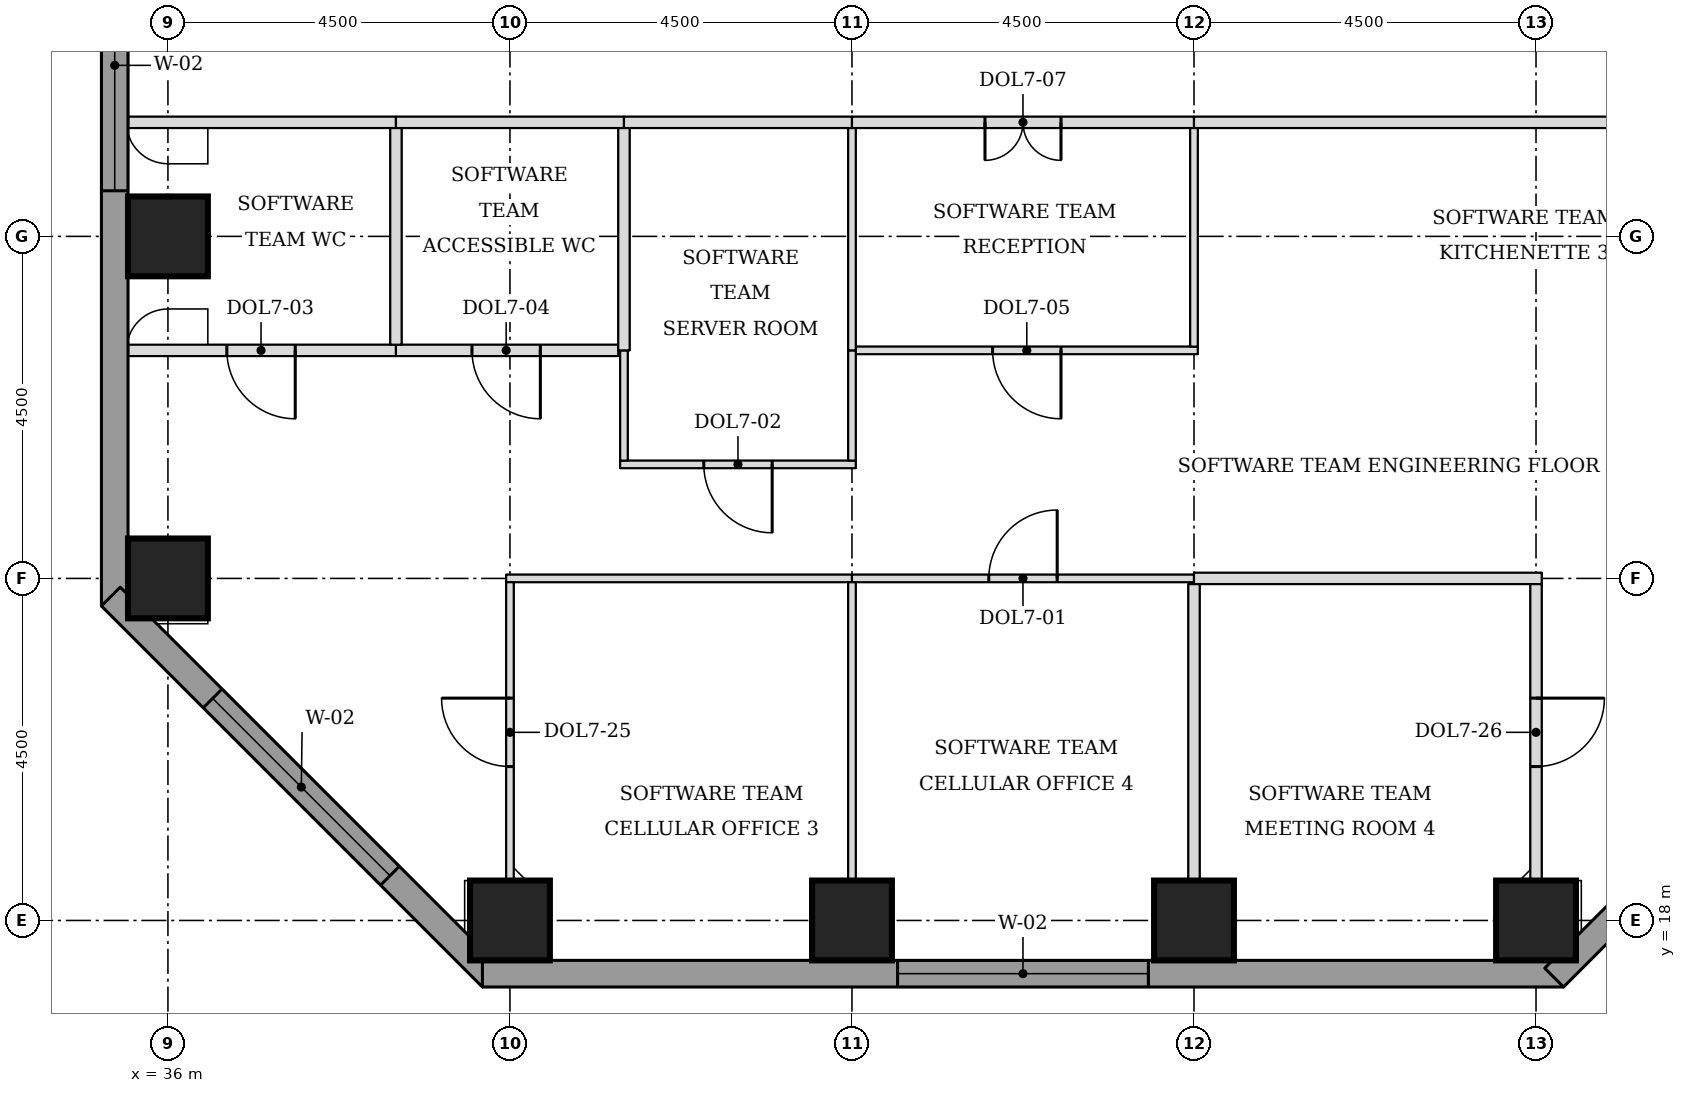
"""IFC4 building model, lengths in metres.
Left out: names, types, materials, properties, quantities, classifications, styles, units other than length and angle.
Written with IfcOpenShell. Run it as: python <this file> out.ifc"""

import sys

from ifc_helpers import new_model, si_unit, direction, frame, frame_2d, origin, origin_2d, place, context, subcontext, project, spatial, rectangle, extrude, element, fill, save


model = new_model("IFC4")
c1 = context("Model", 3, precision=1e-05, world=origin(), true_north=direction((0.0, 1.0)))
c2 = subcontext(c1, "Body", "Model", "MODEL_VIEW")
j1 = project(units=[si_unit("LENGTHUNIT", "METRE"), si_unit("PLANEANGLEUNIT", "RADIAN")], contexts=[c1])
p1 = place(None, origin())
s1 = spatial("IfcSite", under=j1, at=p1, CompositionType="ELEMENT")
p2 = place(p1, origin())
s2 = spatial("IfcBuilding", under=s1, at=p2, CompositionType="ELEMENT")
p3 = place(p2, frame((0.0, 0.0, 134.4)))
s3 = spatial("IfcBuildingStorey", under=s2, at=p3, CompositionType="ELEMENT", Elevation=134.4)
for number, where, z_axis, x_axis in (
    (1, (40.5, 18.0, 0.0), (0.0, 0.0, 1.0), (1.0, 0.0, 0.0)),
    (2, (45.0, 18.0, 0.0), (0.0, 0.0, 1.0), (1.0, 0.0, 0.0)),
    (3, (49.5, 18.0, 0.0), (0.0, 0.0, 1.0), (1.0, 0.0, 0.0)),
    (4, (54.0, 18.0, 0.0), (0.0, 0.0, 1.0), (1.0, 0.0, 0.0)),
    (5, (36.0, 22.5, 0.0), (0.0, 0.0, 1.0), (1.0, 0.0, 0.0)),
    (6, (36.0, 27.0, 0.0), (0.0, 0.0, 1.0), (1.0, 0.0, 0.0)),
):
    element("IfcColumn", number, at=place(p3, frame(where, z_axis=z_axis, x_axis=x_axis)), inside=s3, PredefinedType="COLUMN", context=c2, shape_type="SweptSolid", body=[
        extrude(rectangle(XDim=1.05, YDim=1.05, at=origin_2d()), origin(), (0.0, 0.0, 1.0), 3.7),
    ])
p4 = place(p3, frame((35.3, 39.975, 0.0), z_axis=(0.0, 0.0, 1.0), x_axis=(0.0, -1.0, 0.0)))
e7 = element("IfcWall", 7, at=p4, inside=s3, PredefinedType="STANDARD", context=c2, shape_type="SweptSolid", body=[
    extrude(rectangle(XDim=17.837, YDim=0.35, at=frame_2d((8.919, 0.0))), origin(), (0.0, 0.0, 1.0), 3.525),
])
p5 = place(p4, frame((0.5, 0.0, 0.9)))
e8 = element("IfcOpeningElement", 8, at=p5, cuts=e7, PredefinedType="OPENING", context=c2, shape_type="SweptSolid", body=[
    extrude(rectangle(XDim=3.3, YDim=1.9, at=frame_2d((1.65, 0.95))), frame((0.0, 0.185, 0.0), z_axis=(0.0, -1.0, 0.0), x_axis=(1.0, 0.0, 0.0)), (0.0, 0.0, 1.0), 0.37),
])
p6 = place(p4, frame((9.075, 0.0, 0.9)))
e9 = element("IfcOpeningElement", 9, at=p6, cuts=e7, PredefinedType="OPENING", context=c2, shape_type="SweptSolid", body=[
    extrude(rectangle(XDim=3.3, YDim=1.9, at=frame_2d((1.65, 0.95))), frame((0.0, 0.185, 0.0), z_axis=(0.0, -1.0, 0.0), x_axis=(1.0, 0.0, 0.0)), (0.0, 0.0, 1.0), 0.37),
])
p7 = place(p3, frame((35.249, 22.261, 0.0), z_axis=(0.0, 0.0, 1.0), x_axis=(0.707106781187, -0.707106781187, 0.0)))
e10 = element("IfcWall", 10, at=p7, inside=s3, PredefinedType="STANDARD", context=c2, shape_type="SweptSolid", body=[
    extrude(rectangle(XDim=7.089, YDim=0.35, at=frame_2d((3.544, 0.0))), origin(), (0.0, 0.0, 1.0), 3.525),
])
p8 = place(p7, frame((1.894, 0.0, 0.9)))
e11 = element("IfcOpeningElement", 11, at=p8, cuts=e10, PredefinedType="OPENING", context=c2, shape_type="SweptSolid", body=[
    extrude(rectangle(XDim=3.3, YDim=1.9, at=frame_2d((1.65, 0.95))), frame((0.0, 0.185, 0.0), z_axis=(0.0, -1.0, 0.0), x_axis=(1.0, 0.0, 0.0)), (0.0, 0.0, 1.0), 0.37),
])
p9 = place(p3, frame((40.138, 17.3, 0.0), z_axis=(0.0, 0.0, 1.0), x_axis=(1.0, 0.0, 0.0)))
e12 = element("IfcWall", 12, at=p9, inside=s3, PredefinedType="STANDARD", context=c2, shape_type="SweptSolid", body=[
    extrude(rectangle(XDim=14.225, YDim=0.35, at=frame_2d((7.112, 0.0))), origin(), (0.0, 0.0, 1.0), 3.525),
])
p10 = place(p9, frame((5.462, 0.0, 0.9)))
e13 = element("IfcOpeningElement", 13, at=p10, cuts=e12, PredefinedType="OPENING", context=c2, shape_type="SweptSolid", body=[
    extrude(rectangle(XDim=3.3, YDim=1.9, at=frame_2d((1.65, 0.95))), frame((0.0, 0.185, 0.0), z_axis=(0.0, -1.0, 0.0), x_axis=(1.0, 0.0, 0.0)), (0.0, 0.0, 1.0), 0.37),
])
p11 = place(p3, frame((54.239, 17.249, 0.0), z_axis=(0.0, 0.0, 1.0), x_axis=(0.707106781187, 0.707106781187, 0.0)))
e14 = element("IfcWall", 14, at=p11, inside=s3, PredefinedType="STANDARD", context=c2, shape_type="SweptSolid", body=[
    extrude(rectangle(XDim=7.089, YDim=0.35, at=frame_2d((3.544, 0.0))), origin(), (0.0, 0.0, 1.0), 3.525),
])
p12 = place(p11, frame((1.894, 0.0, 0.9)))
e15 = element("IfcOpeningElement", 15, at=p12, cuts=e14, PredefinedType="OPENING", context=c2, shape_type="SweptSolid", body=[
    extrude(rectangle(XDim=3.3, YDim=1.9, at=frame_2d((1.65, 0.95))), frame((0.0, 0.185, 0.0), z_axis=(0.0, -1.0, 0.0), x_axis=(1.0, 0.0, 0.0)), (0.0, 0.0, 1.0), 0.37),
])
p13 = place(p3, frame((40.45, 22.5, 0.0), z_axis=(0.0, 0.0, 1.0), x_axis=(1.0, 0.0, 0.0)))
e16 = element("IfcWall", 16, at=p13, inside=s3, PredefinedType="PARTITIONING", context=c2, shape_type="SweptSolid", body=[
    extrude(rectangle(XDim=4.55, YDim=0.1, at=frame_2d((2.275, 0.0))), origin(), (0.0, 0.0, 1.0), 2.55),
])
p14 = place(p3, frame((45.0, 22.5, 0.0), z_axis=(0.0, 0.0, 1.0), x_axis=(1.0, 0.0, 0.0)))
e17 = element("IfcWall", 17, at=p14, inside=s3, PredefinedType="PARTITIONING", context=c2, shape_type="SweptSolid", body=[
    extrude(rectangle(XDim=4.5, YDim=0.1, at=frame_2d((2.25, 0.0))), origin(), (0.0, 0.0, 1.0), 2.55),
])
p15 = place(p14, frame((1.8, 0.0, 0.0)))
e18 = element("IfcOpeningElement", 18, at=p15, cuts=e17, PredefinedType="OPENING", context=c2, shape_type="SweptSolid", body=[
    extrude(rectangle(XDim=0.9, YDim=2.1, at=frame_2d((0.45, 1.05))), frame((0.0, 0.06, 0.0), z_axis=(0.0, -1.0, 0.0), x_axis=(1.0, 0.0, 0.0)), (0.0, 0.0, 1.0), 0.12),
])
p16 = place(p3, frame((49.5, 22.5, 0.0), z_axis=(0.0, 0.0, 1.0), x_axis=(1.0, 0.0, 0.0)))
e19 = element("IfcWall", 19, at=p16, inside=s3, PredefinedType="PARTITIONING", context=c2, shape_type="SweptSolid", body=[
    extrude(rectangle(XDim=4.575, YDim=0.15, at=frame_2d((2.288, 0.0))), origin(), (0.0, 0.0, 1.0), 2.55),
])
p17 = place(p3, frame((41.95, 24.0, 0.0), z_axis=(0.0, 0.0, 1.0), x_axis=(1.0, 0.0, 0.0)))
e20 = element("IfcWall", 20, at=p17, inside=s3, PredefinedType="PARTITIONING", context=c2, shape_type="SweptSolid", body=[
    extrude(rectangle(XDim=3.1, YDim=0.1, at=frame_2d((1.55, 0.0))), origin(), (0.0, 0.0, 1.0), 3.55),
])
p18 = place(p17, frame((1.1, 0.0, 0.0)))
e21 = element("IfcOpeningElement", 21, at=p18, cuts=e20, PredefinedType="OPENING", context=c2, shape_type="SweptSolid", body=[
    extrude(rectangle(XDim=0.9, YDim=2.1, at=frame_2d((0.45, 1.05))), frame((0.0, 0.06, 0.0), z_axis=(0.0, -1.0, 0.0), x_axis=(1.0, 0.0, 0.0)), (0.0, 0.0, 1.0), 0.12),
])
p19 = place(p3, frame((35.475, 25.5, 0.0), z_axis=(0.0, 0.0, 1.0), x_axis=(1.0, 0.0, 0.0)))
e22 = element("IfcWall", 22, at=p19, inside=s3, PredefinedType="PARTITIONING", context=c2, shape_type="SweptSolid", body=[
    extrude(rectangle(XDim=3.525, YDim=0.15, at=frame_2d((1.762, 0.0))), origin(), (0.0, 0.0, 1.0), 3.55),
])
p20 = place(p19, frame((1.3, 0.0, 0.0)))
e23 = element("IfcOpeningElement", 23, at=p20, cuts=e22, PredefinedType="OPENING", context=c2, shape_type="SweptSolid", body=[
    extrude(rectangle(XDim=0.9, YDim=2.1, at=frame_2d((0.45, 1.05))), frame((0.0, 0.085, 0.0), z_axis=(0.0, -1.0, 0.0), x_axis=(1.0, 0.0, 0.0)), (0.0, 0.0, 1.0), 0.17),
])
p21 = place(p3, frame((39.0, 25.5, 0.0), z_axis=(0.0, 0.0, 1.0), x_axis=(1.0, 0.0, 0.0)))
e24 = element("IfcWall", 24, at=p21, inside=s3, PredefinedType="PARTITIONING", context=c2, shape_type="SweptSolid", body=[
    extrude(rectangle(XDim=2.925, YDim=0.15, at=frame_2d((1.462, 0.0))), origin(), (0.0, 0.0, 1.0), 3.55),
])
p22 = place(p21, frame((1.0, 0.0, 0.0)))
e25 = element("IfcOpeningElement", 25, at=p22, cuts=e24, PredefinedType="OPENING", context=c2, shape_type="SweptSolid", body=[
    extrude(rectangle(XDim=0.9, YDim=2.1, at=frame_2d((0.45, 1.05))), frame((0.0, 0.085, 0.0), z_axis=(0.0, -1.0, 0.0), x_axis=(1.0, 0.0, 0.0)), (0.0, 0.0, 1.0), 0.17),
])
p23 = place(p3, frame((45.05, 25.5, 0.0), z_axis=(0.0, 0.0, 1.0), x_axis=(1.0, 0.0, 0.0)))
e26 = element("IfcWall", 26, at=p23, inside=s3, PredefinedType="PARTITIONING", context=c2, shape_type="SweptSolid", body=[
    extrude(rectangle(XDim=4.5, YDim=0.1, at=frame_2d((2.25, 0.0))), origin(), (0.0, 0.0, 1.0), 3.55),
])
p24 = place(p23, frame((1.8, 0.0, 0.0)))
e27 = element("IfcOpeningElement", 27, at=p24, cuts=e26, PredefinedType="OPENING", context=c2, shape_type="SweptSolid", body=[
    extrude(rectangle(XDim=0.9, YDim=2.1, at=frame_2d((0.45, 1.05))), frame((0.0, 0.06, 0.0), z_axis=(0.0, -1.0, 0.0), x_axis=(1.0, 0.0, 0.0)), (0.0, 0.0, 1.0), 0.12),
])
p25 = place(p3, frame((35.475, 28.5, 0.0), z_axis=(0.0, 0.0, 1.0), x_axis=(1.0, 0.0, 0.0)))
e28 = element("IfcWall", 28, at=p25, inside=s3, PredefinedType="PARTITIONING", context=c2, shape_type="SweptSolid", body=[
    extrude(rectangle(XDim=3.525, YDim=0.15, at=frame_2d((1.762, 0.0))), origin(), (0.0, 0.0, 1.0), 3.55),
])
for number, where, z_axis, x_axis in (
    (29, (39.0, 28.5, 0.0), (0.0, 0.0, 1.0), (1.0, 0.0, 0.0)),
    (30, (42.0, 28.5, 0.0), (0.0, 0.0, 1.0), (1.0, 0.0, 0.0)),
):
    element("IfcWall", number, at=place(p3, frame(where, z_axis=z_axis, x_axis=x_axis)), inside=s3, PredefinedType="PARTITIONING", context=c2, shape_type="SweptSolid", body=[
        extrude(rectangle(XDim=3.0, YDim=0.15, at=frame_2d((1.5, 0.0))), origin(), (0.0, 0.0, 1.0), 3.55),
    ])
p26 = place(p3, frame((45.0, 28.5, 0.0), z_axis=(0.0, 0.0, 1.0), x_axis=(1.0, 0.0, 0.0)))
e31 = element("IfcWall", 31, at=p26, inside=s3, PredefinedType="PARTITIONING", context=c2, shape_type="SweptSolid", body=[
    extrude(rectangle(XDim=4.5, YDim=0.15, at=frame_2d((2.25, 0.0))), origin(), (0.0, 0.0, 1.0), 3.55),
])
p27 = place(p26, frame((1.75, 0.0, 0.0)))
e32 = element("IfcOpeningElement", 32, at=p27, cuts=e31, PredefinedType="OPENING", context=c2, shape_type="SweptSolid", body=[
    extrude(rectangle(XDim=1.0, YDim=2.1, at=frame_2d((0.5, 1.05))), frame((0.0, 0.085, 0.0), z_axis=(0.0, -1.0, 0.0), x_axis=(1.0, 0.0, 0.0)), (0.0, 0.0, 1.0), 0.17),
])
p28 = place(p3, frame((49.5, 28.5, 0.0), z_axis=(0.0, 0.0, 1.0), x_axis=(1.0, 0.0, 0.0)))
e33 = element("IfcWall", 33, at=p28, inside=s3, PredefinedType="PARTITIONING", context=c2, shape_type="SweptSolid", body=[
    extrude(rectangle(XDim=6.0, YDim=0.15, at=frame_2d((3.0, 0.0))), origin(), (0.0, 0.0, 1.0), 3.55),
])
p29 = place(p3, frame((45.0, 17.475, 0.0), z_axis=(0.0, 0.0, 1.0), x_axis=(0.0, 1.0, 0.0)))
e34 = element("IfcWall", 34, at=p29, inside=s3, PredefinedType="PARTITIONING", context=c2, shape_type="SweptSolid", body=[
    extrude(rectangle(XDim=4.975, YDim=0.1, at=frame_2d((2.487, 0.0))), origin(), (0.0, 0.0, 1.0), 3.55),
])
p30 = place(p3, frame((49.5, 17.475, 0.0), z_axis=(0.0, 0.0, 1.0), x_axis=(0.0, 1.0, 0.0)))
e35 = element("IfcWall", 35, at=p30, inside=s3, PredefinedType="PARTITIONING", context=c2, shape_type="SweptSolid", body=[
    extrude(rectangle(XDim=4.95, YDim=0.15, at=frame_2d((2.475, 0.0))), origin(), (0.0, 0.0, 1.0), 3.55),
])
p31 = place(p3, frame((40.5, 18.525, 0.0), z_axis=(0.0, 0.0, 1.0), x_axis=(0.0, 1.0, 0.0)))
e36 = element("IfcWall", 36, at=p31, inside=s3, PredefinedType="PARTITIONING", context=c2, shape_type="SweptSolid", body=[
    extrude(rectangle(XDim=3.925, YDim=0.1, at=frame_2d((1.962, 0.0))), origin(), (0.0, 0.0, 1.0), 3.55),
])
p32 = place(p31, frame((1.5, 0.0, 0.0)))
e37 = element("IfcOpeningElement", 37, at=p32, cuts=e36, PredefinedType="OPENING", context=c2, shape_type="SweptSolid", body=[
    extrude(rectangle(XDim=0.9, YDim=2.1, at=frame_2d((0.45, 1.05))), frame((0.0, 0.06, 0.0), z_axis=(0.0, -1.0, 0.0), x_axis=(1.0, 0.0, 0.0)), (0.0, 0.0, 1.0), 0.12),
])
p33 = place(p3, frame((54.0, 18.525, 0.0), z_axis=(0.0, 0.0, 1.0), x_axis=(0.0, 1.0, 0.0)))
e38 = element("IfcWall", 38, at=p33, inside=s3, PredefinedType="PARTITIONING", context=c2, shape_type="SweptSolid", body=[
    extrude(rectangle(XDim=3.9, YDim=0.15, at=frame_2d((1.95, 0.0))), origin(), (0.0, 0.0, 1.0), 3.55),
])
p34 = place(p33, frame((1.5, 0.0, 0.0)))
e39 = element("IfcOpeningElement", 39, at=p34, cuts=e38, PredefinedType="OPENING", context=c2, shape_type="SweptSolid", body=[
    extrude(rectangle(XDim=0.9, YDim=2.1, at=frame_2d((0.45, 1.05))), frame((0.0, 0.085, 0.0), z_axis=(0.0, -1.0, 0.0), x_axis=(1.0, 0.0, 0.0)), (0.0, 0.0, 1.0), 0.17),
])
for number, where, z_axis, x_axis in (
    (40, (42.0, 24.05, 0.0), (0.0, 0.0, 1.0), (0.0, 1.0, 0.0)),
    (41, (45.0, 24.05, 0.0), (0.0, 0.0, 1.0), (0.0, 1.0, 0.0)),
):
    element("IfcWall", number, at=place(p3, frame(where, z_axis=z_axis, x_axis=x_axis)), inside=s3, PredefinedType="PARTITIONING", context=c2, shape_type="SweptSolid", body=[
        extrude(rectangle(XDim=1.45, YDim=0.1, at=frame_2d((0.725, 0.0))), origin(), (0.0, 0.0, 1.0), 3.55),
    ])
p35 = place(p3, frame((42.0, 25.5, 0.0), z_axis=(0.0, 0.0, 1.0), x_axis=(0.0, 1.0, 0.0)))
e42 = element("IfcWall", 42, at=p35, inside=s3, PredefinedType="PARTITIONING", context=c2, shape_type="SweptSolid", body=[
    extrude(rectangle(XDim=2.925, YDim=0.15, at=frame_2d((1.462, 0.0))), origin(), (0.0, 0.0, 1.0), 3.55),
])
p36 = place(p3, frame((45.0, 25.5, 0.0), z_axis=(0.0, 0.0, 1.0), x_axis=(0.0, 1.0, 0.0)))
e43 = element("IfcWall", 43, at=p36, inside=s3, PredefinedType="PARTITIONING", context=c2, shape_type="SweptSolid", body=[
    extrude(rectangle(XDim=2.925, YDim=0.1, at=frame_2d((1.462, 0.0))), origin(), (0.0, 0.0, 1.0), 3.55),
])
p37 = place(p3, frame((49.5, 25.55, 0.0), z_axis=(0.0, 0.0, 1.0), x_axis=(0.0, 1.0, 0.0)))
e44 = element("IfcWall", 44, at=p37, inside=s3, PredefinedType="PARTITIONING", context=c2, shape_type="SweptSolid", body=[
    extrude(rectangle(XDim=2.875, YDim=0.1, at=frame_2d((1.438, 0.0))), origin(), (0.0, 0.0, 1.0), 3.55),
])
p38 = place(p3, frame((39.0, 25.575, 0.0), z_axis=(0.0, 0.0, 1.0), x_axis=(0.0, 1.0, 0.0)))
e45 = element("IfcWall", 45, at=p38, inside=s3, PredefinedType="PARTITIONING", context=c2, shape_type="SweptSolid", body=[
    extrude(rectangle(XDim=2.85, YDim=0.15, at=frame_2d((1.425, 0.0))), origin(), (0.0, 0.0, 1.0), 3.55),
])
p39 = place(p6, origin())
e46 = element("IfcWindow", 46, at=p39, inside=s3, PartitioningType="SINGLE_PANEL", PredefinedType="WINDOW", context=c2, shape_type="SweptSolid", body=[
    extrude(rectangle(XDim=3.3, YDim=1.9, at=frame_2d((1.65, 0.95))), frame((0.0, 0.085, 0.0), z_axis=(0.0, -1.0, 0.0), x_axis=(1.0, 0.0, 0.0)), (0.0, 0.0, 1.0), 0.06),
])
fill(e9, e46)
p40 = place(p8, origin())
e47 = element("IfcWindow", 47, at=p40, inside=s3, PartitioningType="SINGLE_PANEL", PredefinedType="WINDOW", context=c2, shape_type="SweptSolid", body=[
    extrude(rectangle(XDim=3.3, YDim=1.9, at=frame_2d((1.65, 0.95))), frame((0.0, 0.085, 0.0), z_axis=(0.0, -1.0, 0.0), x_axis=(1.0, 0.0, 0.0)), (0.0, 0.0, 1.0), 0.06),
])
fill(e11, e47)
p41 = place(p10, origin())
e48 = element("IfcWindow", 48, at=p41, inside=s3, PartitioningType="SINGLE_PANEL", PredefinedType="WINDOW", context=c2, shape_type="SweptSolid", body=[
    extrude(rectangle(XDim=3.3, YDim=1.9, at=frame_2d((1.65, 0.95))), frame((0.0, 0.085, 0.0), z_axis=(0.0, -1.0, 0.0), x_axis=(1.0, 0.0, 0.0)), (0.0, 0.0, 1.0), 0.06),
])
fill(e13, e48)
p42 = place(p27, frame((1.0, 0.0, 0.0), z_axis=(0.0, 0.0, 1.0), x_axis=(-1.0, 0.0, 0.0)))
e49 = element("IfcDoor", 49, at=p42, inside=s3, OperationType="DOUBLE_DOOR_SINGLE_SWING", PredefinedType="DOOR", context=c2, shape_type="SweptSolid", body=[
    extrude(rectangle(XDim=1.0, YDim=2.1, at=frame_2d((0.5, 1.05))), frame((0.0, 0.025, 0.0), z_axis=(0.0, -1.0, 0.0), x_axis=(1.0, 0.0, 0.0)), (0.0, 0.0, 1.0), 0.05),
])
fill(e32, e49)
p43 = place(p24, frame((0.9, 0.0, 0.0), z_axis=(0.0, 0.0, 1.0), x_axis=(-1.0, 0.0, 0.0)))
e50 = element("IfcDoor", 50, at=p43, inside=s3, OperationType="SINGLE_SWING_LEFT", PredefinedType="DOOR", context=c2, shape_type="SweptSolid", body=[
    extrude(rectangle(XDim=0.9, YDim=2.1, at=frame_2d((0.45, 1.05))), frame((0.0, 0.025, 0.0), z_axis=(0.0, -1.0, 0.0), x_axis=(1.0, 0.0, 0.0)), (0.0, 0.0, 1.0), 0.05),
])
fill(e27, e50)
p44 = place(p22, frame((0.9, 0.0, 0.0), z_axis=(0.0, 0.0, 1.0), x_axis=(-1.0, 0.0, 0.0)))
e51 = element("IfcDoor", 51, at=p44, inside=s3, OperationType="SINGLE_SWING_LEFT", PredefinedType="DOOR", context=c2, shape_type="SweptSolid", body=[
    extrude(rectangle(XDim=0.9, YDim=2.1, at=frame_2d((0.45, 1.05))), frame((0.0, 0.025, 0.0), z_axis=(0.0, -1.0, 0.0), x_axis=(1.0, 0.0, 0.0)), (0.0, 0.0, 1.0), 0.05),
])
fill(e25, e51)
p45 = place(p32, origin())
e52 = element("IfcDoor", 52, at=p45, inside=s3, OperationType="SINGLE_SWING_RIGHT", PredefinedType="DOOR", context=c2, shape_type="SweptSolid", body=[
    extrude(rectangle(XDim=0.9, YDim=2.1, at=frame_2d((0.45, 1.05))), frame((0.0, 0.025, 0.0), z_axis=(0.0, -1.0, 0.0), x_axis=(1.0, 0.0, 0.0)), (0.0, 0.0, 1.0), 0.05),
])
fill(e37, e52)
p46 = place(p15, origin())
e53 = element("IfcDoor", 53, at=p46, inside=s3, OperationType="SINGLE_SWING_RIGHT", PredefinedType="DOOR", context=c2, shape_type="SweptSolid", body=[
    extrude(rectangle(XDim=0.9, YDim=2.1, at=frame_2d((0.45, 1.05))), frame((0.0, 0.025, 0.0), z_axis=(0.0, -1.0, 0.0), x_axis=(1.0, 0.0, 0.0)), (0.0, 0.0, 1.0), 0.05),
])
fill(e18, e53)
p47 = place(p34, frame((0.9, 0.0, 0.0), z_axis=(0.0, 0.0, 1.0), x_axis=(-1.0, 0.0, 0.0)))
e54 = element("IfcDoor", 54, at=p47, inside=s3, OperationType="SINGLE_SWING_LEFT", PredefinedType="DOOR", context=c2, shape_type="SweptSolid", body=[
    extrude(rectangle(XDim=0.9, YDim=2.1, at=frame_2d((0.45, 1.05))), frame((0.0, 0.025, 0.0), z_axis=(0.0, -1.0, 0.0), x_axis=(1.0, 0.0, 0.0)), (0.0, 0.0, 1.0), 0.05),
])
fill(e39, e54)
p48 = place(p18, frame((0.9, 0.0, 0.0), z_axis=(0.0, 0.0, 1.0), x_axis=(-1.0, 0.0, 0.0)))
e55 = element("IfcDoor", 55, at=p48, inside=s3, OperationType="SINGLE_SWING_LEFT", PredefinedType="DOOR", context=c2, shape_type="SweptSolid", body=[
    extrude(rectangle(XDim=0.9, YDim=2.1, at=frame_2d((0.45, 1.05))), frame((0.0, 0.025, 0.0), z_axis=(0.0, -1.0, 0.0), x_axis=(1.0, 0.0, 0.0)), (0.0, 0.0, 1.0), 0.05),
])
fill(e21, e55)
p49 = place(p20, frame((0.9, 0.0, 0.0), z_axis=(0.0, 0.0, 1.0), x_axis=(-1.0, 0.0, 0.0)))
e56 = element("IfcDoor", 56, at=p49, inside=s3, OperationType="SINGLE_SWING_LEFT", PredefinedType="DOOR", context=c2, shape_type="SweptSolid", body=[
    extrude(rectangle(XDim=0.9, YDim=2.1, at=frame_2d((0.45, 1.05))), frame((0.0, 0.025, 0.0), z_axis=(0.0, -1.0, 0.0), x_axis=(1.0, 0.0, 0.0)), (0.0, 0.0, 1.0), 0.05),
])
fill(e23, e56)
save(model, sys.argv[1])
